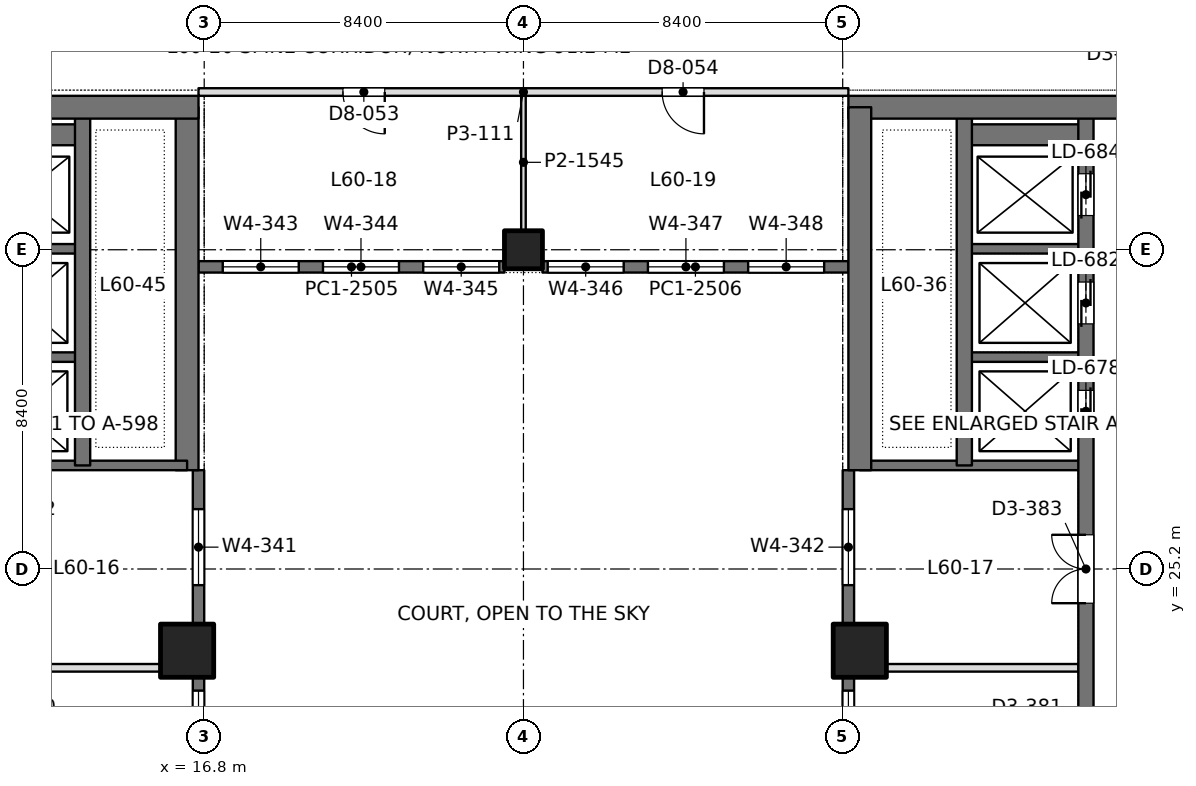
"""IFC4 building model, lengths in metres.
Left out: names, types, materials, properties, quantities, classifications, styles, units other than length and angle.
Written with IfcOpenShell. Run it as: python <this file> out.ifc"""

import sys

from ifc_helpers import new_model, si_unit, direction, frame, frame_2d, origin, origin_2d, place, context, subcontext, project, spatial, rectangle, extrude, element, fill, save


model = new_model("IFC4")
c1 = context("Model", 3, precision=1e-05, world=origin(), true_north=direction((0.0, 1.0)))
c2 = subcontext(c1, "Body", "Model", "MODEL_VIEW")
j1 = project(units=[si_unit("LENGTHUNIT", "METRE"), si_unit("PLANEANGLEUNIT", "RADIAN")], contexts=[c1])
p1 = place(None, origin())
s1 = spatial("IfcSite", under=j1, at=p1, CompositionType="ELEMENT")
p2 = place(p1, origin())
s2 = spatial("IfcBuilding", under=s1, at=p2, CompositionType="ELEMENT")
p3 = place(p2, frame((0.0, 0.0, 263.7)))
s3 = spatial("IfcBuildingStorey", under=s2, at=p3, CompositionType="ELEMENT", Elevation=263.7)
p4 = place(p3, frame((25.2, 33.6, 0.0), z_axis=(0.0, 0.0, 1.0), x_axis=(1.0, 0.0, 0.0)))
e1 = element("IfcColumn", 1, at=p4, inside=s3, PredefinedType="COLUMN", context=c2, shape_type="SweptSolid", body=[
    extrude(rectangle(XDim=1.0, YDim=1.0, at=origin_2d()), origin(), (0.0, 0.0, 1.0), 4.5),
])
for number, where, z_axis, x_axis in (
    (2, (16.35, 23.05, 0.0), (0.0, 0.0, 1.0), (1.0, 0.0, 0.0)),
    (3, (34.05, 23.05, 0.0), (0.0, 0.0, 1.0), (1.0, 0.0, 0.0)),
):
    element("IfcColumn", number, at=place(p3, frame(where, z_axis=z_axis, x_axis=x_axis)), inside=s3, PredefinedType="COLUMN", context=c2, shape_type="SweptSolid", body=[
        extrude(rectangle(XDim=1.4, YDim=1.4, at=origin_2d()), origin(), (0.0, 0.0, 1.0), 4.5),
    ])
p5 = place(p3, frame((-1.05, 37.35, 0.0), z_axis=(0.0, 0.0, 1.0), x_axis=(1.0, 0.0, 0.0)))
e4 = element("IfcWall", 4, at=p5, inside=s3, PredefinedType="SHEAR", context=c2, shape_type="SweptSolid", body=[
    extrude(rectangle(XDim=17.7, YDim=0.6, at=frame_2d((8.85, 0.0))), origin(), (0.0, 0.0, 1.0), 4.5),
])
p6 = place(p5, frame((8.8, 0.0, 0.0)))
e5 = element("IfcOpeningElement", 5, at=p6, cuts=e4, PredefinedType="OPENING", context=c2, shape_type="SweptSolid", body=[
    extrude(rectangle(XDim=1.8, YDim=2.4, at=frame_2d((0.9, 1.2))), frame((0.0, 0.31, 0.0), z_axis=(0.0, -1.0, 0.0), x_axis=(1.0, 0.0, 0.0)), (0.0, 0.0, 1.0), 0.62),
])
p7 = place(p3, frame((16.35, 27.8, 0.0), z_axis=(0.0, 0.0, 1.0), x_axis=(0.0, 1.0, 0.0)))
e6 = element("IfcWall", 6, at=p7, inside=s3, PredefinedType="SHEAR", context=c2, shape_type="SweptSolid", body=[
    extrude(rectangle(XDim=9.55, YDim=0.6, at=frame_2d((4.775, 0.0))), origin(), (0.0, 0.0, 1.0), 4.5),
])
p8 = place(p3, frame((13.6, 27.925, 0.0), z_axis=(0.0, 0.0, 1.0), x_axis=(0.0, 1.0, 0.0)))
e7 = element("IfcWall", 7, at=p8, inside=s3, PredefinedType="SHEAR", context=c2, shape_type="SweptSolid", body=[
    extrude(rectangle(XDim=9.425, YDim=0.4, at=frame_2d((4.712, 0.0))), origin(), (0.0, 0.0, 1.0), 4.5),
])
p9 = place(p3, frame((10.4, 27.925, 0.0), z_axis=(0.0, 0.0, 1.0), x_axis=(1.0, 0.0, 0.0)))
e8 = element("IfcWall", 8, at=p9, inside=s3, PredefinedType="SHEAR", context=c2, shape_type="SweptSolid", body=[
    extrude(rectangle(XDim=5.95, YDim=0.25, at=frame_2d((2.975, 0.0))), origin(), (0.0, 0.0, 1.0), 4.5),
])
for number, where, z_axis, x_axis in (
    (9, (10.4, 30.775, 0.0), (0.0, 0.0, 1.0), (1.0, 0.0, 0.0)),
    (10, (10.4, 33.625, 0.0), (0.0, 0.0, 1.0), (1.0, 0.0, 0.0)),
):
    element("IfcWall", number, at=place(p3, frame(where, z_axis=z_axis, x_axis=x_axis)), inside=s3, PredefinedType="SHEAR", context=c2, shape_type="SweptSolid", body=[
        extrude(rectangle(XDim=3.2, YDim=0.25, at=frame_2d((1.6, 0.0))), origin(), (0.0, 0.0, 1.0), 4.5),
    ])
p10 = place(p3, frame((10.4, 36.625, 0.0), z_axis=(0.0, 0.0, 1.0), x_axis=(1.0, 0.0, 0.0)))
e11 = element("IfcWall", 11, at=p10, inside=s3, PredefinedType="SHEAR", context=c2, shape_type="SweptSolid", body=[
    extrude(rectangle(XDim=3.2, YDim=0.55, at=frame_2d((1.6, 0.0))), origin(), (0.0, 0.0, 1.0), 4.5),
])
p11 = place(p3, frame((33.75, 37.35, 0.0), z_axis=(0.0, 0.0, 1.0), x_axis=(1.0, 0.0, 0.0)))
e12 = element("IfcWall", 12, at=p11, inside=s3, PredefinedType="SHEAR", context=c2, shape_type="SweptSolid", body=[
    extrude(rectangle(XDim=17.7, YDim=0.6, at=frame_2d((8.85, 0.0))), origin(), (0.0, 0.0, 1.0), 4.5),
])
p12 = place(p11, frame((7.1, 0.0, 0.0)))
e13 = element("IfcOpeningElement", 13, at=p12, cuts=e12, PredefinedType="OPENING", context=c2, shape_type="SweptSolid", body=[
    extrude(rectangle(XDim=1.8, YDim=2.4, at=frame_2d((0.9, 1.2))), frame((0.0, 0.31, 0.0), z_axis=(0.0, -1.0, 0.0), x_axis=(1.0, 0.0, 0.0)), (0.0, 0.0, 1.0), 0.62),
])
p13 = place(p3, frame((34.05, 27.8, 0.0), z_axis=(0.0, 0.0, 1.0), x_axis=(0.0, 1.0, 0.0)))
e14 = element("IfcWall", 14, at=p13, inside=s3, PredefinedType="SHEAR", context=c2, shape_type="SweptSolid", body=[
    extrude(rectangle(XDim=9.55, YDim=0.6, at=frame_2d((4.775, 0.0))), origin(), (0.0, 0.0, 1.0), 4.5),
])
p14 = place(p3, frame((40.0, 13.05, 0.0), z_axis=(0.0, 0.0, 1.0), x_axis=(0.0, 1.0, 0.0)))
e15 = element("IfcWall", 15, at=p14, inside=s3, PredefinedType="SHEAR", context=c2, shape_type="SweptSolid", body=[
    extrude(rectangle(XDim=24.3, YDim=0.4, at=frame_2d((12.15, 0.0))), origin(), (0.0, 0.0, 1.0), 4.5),
])
p15 = place(p14, frame((15.75, 0.0, 0.0)))
e16 = element("IfcOpeningElement", 16, at=p15, cuts=e15, PredefinedType="OPENING", context=c2, shape_type="SweptSolid", body=[
    extrude(rectangle(XDim=1.1, YDim=2.2, at=frame_2d((0.55, 1.1))), frame((0.0, 0.21, 0.0), z_axis=(0.0, -1.0, 0.0), x_axis=(1.0, 0.0, 0.0)), (0.0, 0.0, 1.0), 0.42),
])
p16 = place(p14, frame((18.6, 0.0, 0.0)))
e17 = element("IfcOpeningElement", 17, at=p16, cuts=e15, PredefinedType="OPENING", context=c2, shape_type="SweptSolid", body=[
    extrude(rectangle(XDim=1.1, YDim=2.2, at=frame_2d((0.55, 1.1))), frame((0.0, 0.21, 0.0), z_axis=(0.0, -1.0, 0.0), x_axis=(1.0, 0.0, 0.0)), (0.0, 0.0, 1.0), 0.42),
])
p17 = place(p14, frame((21.45, 0.0, 0.0)))
e18 = element("IfcOpeningElement", 18, at=p17, cuts=e15, PredefinedType="OPENING", context=c2, shape_type="SweptSolid", body=[
    extrude(rectangle(XDim=1.1, YDim=2.2, at=frame_2d((0.55, 1.1))), frame((0.0, 0.21, 0.0), z_axis=(0.0, -1.0, 0.0), x_axis=(1.0, 0.0, 0.0)), (0.0, 0.0, 1.0), 0.42),
])
p18 = place(p14, frame((6.05, 0.0, 0.0)))
e19 = element("IfcOpeningElement", 19, at=p18, cuts=e15, PredefinedType="OPENING", context=c2, shape_type="SweptSolid", body=[
    extrude(rectangle(XDim=1.8, YDim=2.4, at=frame_2d((0.9, 1.2))), frame((0.0, 0.21, 0.0), z_axis=(0.0, -1.0, 0.0), x_axis=(1.0, 0.0, 0.0)), (0.0, 0.0, 1.0), 0.42),
])
p19 = place(p14, frame((11.25, 0.0, 0.0)))
e20 = element("IfcOpeningElement", 20, at=p19, cuts=e15, PredefinedType="OPENING", context=c2, shape_type="SweptSolid", body=[
    extrude(rectangle(XDim=1.8, YDim=2.4, at=frame_2d((0.9, 1.2))), frame((0.0, 0.21, 0.0), z_axis=(0.0, -1.0, 0.0), x_axis=(1.0, 0.0, 0.0)), (0.0, 0.0, 1.0), 0.42),
])
p20 = place(p3, frame((36.8, 27.925, 0.0), z_axis=(0.0, 0.0, 1.0), x_axis=(0.0, 1.0, 0.0)))
e21 = element("IfcWall", 21, at=p20, inside=s3, PredefinedType="SHEAR", context=c2, shape_type="SweptSolid", body=[
    extrude(rectangle(XDim=9.425, YDim=0.4, at=frame_2d((4.712, 0.0))), origin(), (0.0, 0.0, 1.0), 4.5),
])
p21 = place(p3, frame((40.0, 27.925, 0.0), z_axis=(0.0, 0.0, 1.0), x_axis=(-1.0, 0.0, 0.0)))
e22 = element("IfcWall", 22, at=p21, inside=s3, PredefinedType="SHEAR", context=c2, shape_type="SweptSolid", body=[
    extrude(rectangle(XDim=5.95, YDim=0.25, at=frame_2d((2.975, 0.0))), origin(), (0.0, 0.0, 1.0), 4.5),
])
for number, where, z_axis, x_axis in (
    (23, (40.0, 30.775, 0.0), (0.0, 0.0, 1.0), (-1.0, 0.0, 0.0)),
    (24, (40.0, 33.625, 0.0), (0.0, 0.0, 1.0), (-1.0, 0.0, 0.0)),
):
    element("IfcWall", number, at=place(p3, frame(where, z_axis=z_axis, x_axis=x_axis)), inside=s3, PredefinedType="SHEAR", context=c2, shape_type="SweptSolid", body=[
        extrude(rectangle(XDim=3.2, YDim=0.25, at=frame_2d((1.6, 0.0))), origin(), (0.0, 0.0, 1.0), 4.5),
    ])
p22 = place(p3, frame((40.0, 36.625, 0.0), z_axis=(0.0, 0.0, 1.0), x_axis=(-1.0, 0.0, 0.0)))
e25 = element("IfcWall", 25, at=p22, inside=s3, PredefinedType="SHEAR", context=c2, shape_type="SweptSolid", body=[
    extrude(rectangle(XDim=3.2, YDim=0.55, at=frame_2d((1.6, 0.0))), origin(), (0.0, 0.0, 1.0), 4.5),
])
p23 = place(p3, frame((16.65, 17.1, 0.0), z_axis=(0.0, 0.0, 1.0), x_axis=(0.0, 1.0, 0.0)))
e26 = element("IfcWall", 26, at=p23, inside=s3, PredefinedType="SOLIDWALL", context=c2, shape_type="SweptSolid", body=[
    extrude(rectangle(XDim=10.7, YDim=0.3, at=frame_2d((5.35, 0.0))), origin(), (0.0, 0.0, 1.0), 4.35),
])
p24 = place(p23, frame((0.55, 0.0, 0.9)))
e27 = element("IfcOpeningElement", 27, at=p24, cuts=e26, PredefinedType="OPENING", context=c2, shape_type="SweptSolid", body=[
    extrude(rectangle(XDim=2.0, YDim=1.9, at=frame_2d((1.0, 0.95))), frame((0.0, 0.16, 0.0), z_axis=(0.0, -1.0, 0.0), x_axis=(1.0, 0.0, 0.0)), (0.0, 0.0, 1.0), 0.32),
])
p25 = place(p23, frame((2.9, 0.0, 0.9)))
e28 = element("IfcOpeningElement", 28, at=p25, cuts=e26, PredefinedType="OPENING", context=c2, shape_type="SweptSolid", body=[
    extrude(rectangle(XDim=2.0, YDim=1.9, at=frame_2d((1.0, 0.95))), frame((0.0, 0.16, 0.0), z_axis=(0.0, -1.0, 0.0), x_axis=(1.0, 0.0, 0.0)), (0.0, 0.0, 1.0), 0.32),
])
p26 = place(p23, frame((7.675, 0.0, 0.9)))
e29 = element("IfcOpeningElement", 29, at=p26, cuts=e26, PredefinedType="OPENING", context=c2, shape_type="SweptSolid", body=[
    extrude(rectangle(XDim=2.0, YDim=1.9, at=frame_2d((1.0, 0.95))), frame((0.0, 0.16, 0.0), z_axis=(0.0, -1.0, 0.0), x_axis=(1.0, 0.0, 0.0)), (0.0, 0.0, 1.0), 0.32),
])
p27 = place(p3, frame((33.75, 17.1, 0.0), z_axis=(0.0, 0.0, 1.0), x_axis=(0.0, 1.0, 0.0)))
e30 = element("IfcWall", 30, at=p27, inside=s3, PredefinedType="SOLIDWALL", context=c2, shape_type="SweptSolid", body=[
    extrude(rectangle(XDim=10.7, YDim=0.3, at=frame_2d((5.35, 0.0))), origin(), (0.0, 0.0, 1.0), 4.35),
])
p28 = place(p27, frame((0.55, 0.0, 0.9)))
e31 = element("IfcOpeningElement", 31, at=p28, cuts=e30, PredefinedType="OPENING", context=c2, shape_type="SweptSolid", body=[
    extrude(rectangle(XDim=2.0, YDim=1.9, at=frame_2d((1.0, 0.95))), frame((0.0, 0.16, 0.0), z_axis=(0.0, -1.0, 0.0), x_axis=(1.0, 0.0, 0.0)), (0.0, 0.0, 1.0), 0.32),
])
p29 = place(p27, frame((2.9, 0.0, 0.9)))
e32 = element("IfcOpeningElement", 32, at=p29, cuts=e30, PredefinedType="OPENING", context=c2, shape_type="SweptSolid", body=[
    extrude(rectangle(XDim=2.0, YDim=1.9, at=frame_2d((1.0, 0.95))), frame((0.0, 0.16, 0.0), z_axis=(0.0, -1.0, 0.0), x_axis=(1.0, 0.0, 0.0)), (0.0, 0.0, 1.0), 0.32),
])
p30 = place(p27, frame((7.675, 0.0, 0.9)))
e33 = element("IfcOpeningElement", 33, at=p30, cuts=e30, PredefinedType="OPENING", context=c2, shape_type="SweptSolid", body=[
    extrude(rectangle(XDim=2.0, YDim=1.9, at=frame_2d((1.0, 0.95))), frame((0.0, 0.16, 0.0), z_axis=(0.0, -1.0, 0.0), x_axis=(1.0, 0.0, 0.0)), (0.0, 0.0, 1.0), 0.32),
])
p31 = place(p3, frame((16.65, 33.15, 0.0), z_axis=(0.0, 0.0, 1.0), x_axis=(1.0, 0.0, 0.0)))
e34 = element("IfcWall", 34, at=p31, inside=s3, PredefinedType="SOLIDWALL", context=c2, shape_type="SweptSolid", body=[
    extrude(rectangle(XDim=8.05, YDim=0.3, at=frame_2d((4.025, 0.0))), origin(), (0.0, 0.0, 1.0), 4.35),
])
p32 = place(p31, frame((0.637, 0.0, 0.9)))
e35 = element("IfcOpeningElement", 35, at=p32, cuts=e34, PredefinedType="OPENING", context=c2, shape_type="SweptSolid", body=[
    extrude(rectangle(XDim=2.0, YDim=1.9, at=frame_2d((1.0, 0.95))), frame((0.0, 0.16, 0.0), z_axis=(0.0, -1.0, 0.0), x_axis=(1.0, 0.0, 0.0)), (0.0, 0.0, 1.0), 0.32),
])
p33 = place(p31, frame((3.275, 0.0, 0.9)))
e36 = element("IfcOpeningElement", 36, at=p33, cuts=e34, PredefinedType="OPENING", context=c2, shape_type="SweptSolid", body=[
    extrude(rectangle(XDim=2.0, YDim=1.9, at=frame_2d((1.0, 0.95))), frame((0.0, 0.16, 0.0), z_axis=(0.0, -1.0, 0.0), x_axis=(1.0, 0.0, 0.0)), (0.0, 0.0, 1.0), 0.32),
])
p34 = place(p31, frame((5.913, 0.0, 0.9)))
e37 = element("IfcOpeningElement", 37, at=p34, cuts=e34, PredefinedType="OPENING", context=c2, shape_type="SweptSolid", body=[
    extrude(rectangle(XDim=2.0, YDim=1.9, at=frame_2d((1.0, 0.95))), frame((0.0, 0.16, 0.0), z_axis=(0.0, -1.0, 0.0), x_axis=(1.0, 0.0, 0.0)), (0.0, 0.0, 1.0), 0.32),
])
p35 = place(p3, frame((25.7, 33.15, 0.0), z_axis=(0.0, 0.0, 1.0), x_axis=(1.0, 0.0, 0.0)))
e38 = element("IfcWall", 38, at=p35, inside=s3, PredefinedType="SOLIDWALL", context=c2, shape_type="SweptSolid", body=[
    extrude(rectangle(XDim=8.05, YDim=0.3, at=frame_2d((4.025, 0.0))), origin(), (0.0, 0.0, 1.0), 4.35),
])
p36 = place(p35, frame((0.137, 0.0, 0.9)))
e39 = element("IfcOpeningElement", 39, at=p36, cuts=e38, PredefinedType="OPENING", context=c2, shape_type="SweptSolid", body=[
    extrude(rectangle(XDim=2.0, YDim=1.9, at=frame_2d((1.0, 0.95))), frame((0.0, 0.16, 0.0), z_axis=(0.0, -1.0, 0.0), x_axis=(1.0, 0.0, 0.0)), (0.0, 0.0, 1.0), 0.32),
])
p37 = place(p35, frame((2.775, 0.0, 0.9)))
e40 = element("IfcOpeningElement", 40, at=p37, cuts=e38, PredefinedType="OPENING", context=c2, shape_type="SweptSolid", body=[
    extrude(rectangle(XDim=2.0, YDim=1.9, at=frame_2d((1.0, 0.95))), frame((0.0, 0.16, 0.0), z_axis=(0.0, -1.0, 0.0), x_axis=(1.0, 0.0, 0.0)), (0.0, 0.0, 1.0), 0.32),
])
p38 = place(p35, frame((5.413, 0.0, 0.9)))
e41 = element("IfcOpeningElement", 41, at=p38, cuts=e38, PredefinedType="OPENING", context=c2, shape_type="SweptSolid", body=[
    extrude(rectangle(XDim=2.0, YDim=1.9, at=frame_2d((1.0, 0.95))), frame((0.0, 0.16, 0.0), z_axis=(0.0, -1.0, 0.0), x_axis=(1.0, 0.0, 0.0)), (0.0, 0.0, 1.0), 0.32),
])
for number, where, z_axis, x_axis in (
    (42, (10.598, 22.6, 0.0), (0.0, 0.0, 1.0), (1.0, 0.0, 0.0)),
    (43, (34.749, 22.6, 0.0), (0.0, 0.0, 1.0), (1.0, 0.0, 0.0)),
):
    element("IfcWall", number, at=place(p3, frame(where, z_axis=z_axis, x_axis=x_axis)), inside=s3, PredefinedType="PARTITIONING", context=c2, shape_type="SweptSolid", body=[
        extrude(rectangle(XDim=5.053, YDim=0.2, at=frame_2d((2.526, 0.0))), origin(), (0.0, 0.0, 1.0), 4.35),
    ])
p39 = place(p3, frame((25.2, 34.099, 0.0), z_axis=(0.0, 0.0, 1.0), x_axis=(0.0, 1.0, 0.0)))
e44 = element("IfcWall", 44, at=p39, inside=s3, PredefinedType="PARTITIONING", context=c2, shape_type="SweptSolid", body=[
    extrude(rectangle(XDim=3.603, YDim=0.12, at=frame_2d((1.801, 0.0))), origin(), (0.0, 0.0, 1.0), 3.8),
])
p40 = place(p3, frame((16.65, 37.75, 0.0), z_axis=(0.0, 0.0, 1.0), x_axis=(1.0, 0.0, 0.0)))
e45 = element("IfcWall", 45, at=p40, inside=s3, PredefinedType="PARTITIONING", context=c2, shape_type="SweptSolid", body=[
    extrude(rectangle(XDim=17.1, YDim=0.2, at=frame_2d((8.55, 0.0))), origin(), (0.0, 0.0, 1.0), 3.8),
])
p41 = place(p40, frame((3.8, 0.0, 0.0)))
e46 = element("IfcOpeningElement", 46, at=p41, cuts=e45, PredefinedType="OPENING", context=c2, shape_type="SweptSolid", body=[
    extrude(rectangle(XDim=1.1, YDim=2.4, at=frame_2d((0.55, 1.2))), frame((0.0, 0.11, 0.0), z_axis=(0.0, -1.0, 0.0), x_axis=(1.0, 0.0, 0.0)), (0.0, 0.0, 1.0), 0.22),
])
p42 = place(p40, frame((12.2, 0.0, 0.0)))
e47 = element("IfcOpeningElement", 47, at=p42, cuts=e45, PredefinedType="OPENING", context=c2, shape_type="SweptSolid", body=[
    extrude(rectangle(XDim=1.1, YDim=2.4, at=frame_2d((0.55, 1.2))), frame((0.0, 0.11, 0.0), z_axis=(0.0, -1.0, 0.0), x_axis=(1.0, 0.0, 0.0)), (0.0, 0.0, 1.0), 0.22),
])
p43 = place(p25, origin())
e48 = element("IfcWindow", 48, at=p43, inside=s3, PartitioningType="SINGLE_PANEL", PredefinedType="WINDOW", context=c2, shape_type="SweptSolid", body=[
    extrude(rectangle(XDim=2.0, YDim=1.9, at=frame_2d((1.0, 0.95))), frame((0.0, 0.03, 0.0), z_axis=(0.0, -1.0, 0.0), x_axis=(1.0, 0.0, 0.0)), (0.0, 0.0, 1.0), 0.06),
])
fill(e28, e48)
p44 = place(p26, origin())
e49 = element("IfcWindow", 49, at=p44, inside=s3, PartitioningType="SINGLE_PANEL", PredefinedType="WINDOW", context=c2, shape_type="SweptSolid", body=[
    extrude(rectangle(XDim=2.0, YDim=1.9, at=frame_2d((1.0, 0.95))), frame((0.0, 0.03, 0.0), z_axis=(0.0, -1.0, 0.0), x_axis=(1.0, 0.0, 0.0)), (0.0, 0.0, 1.0), 0.06),
])
fill(e29, e49)
p45 = place(p29, origin())
e50 = element("IfcWindow", 50, at=p45, inside=s3, PartitioningType="SINGLE_PANEL", PredefinedType="WINDOW", context=c2, shape_type="SweptSolid", body=[
    extrude(rectangle(XDim=2.0, YDim=1.9, at=frame_2d((1.0, 0.95))), frame((0.0, 0.03, 0.0), z_axis=(0.0, -1.0, 0.0), x_axis=(1.0, 0.0, 0.0)), (0.0, 0.0, 1.0), 0.06),
])
fill(e32, e50)
p46 = place(p30, origin())
e51 = element("IfcWindow", 51, at=p46, inside=s3, PartitioningType="SINGLE_PANEL", PredefinedType="WINDOW", context=c2, shape_type="SweptSolid", body=[
    extrude(rectangle(XDim=2.0, YDim=1.9, at=frame_2d((1.0, 0.95))), frame((0.0, 0.03, 0.0), z_axis=(0.0, -1.0, 0.0), x_axis=(1.0, 0.0, 0.0)), (0.0, 0.0, 1.0), 0.06),
])
fill(e33, e51)
p47 = place(p32, origin())
e52 = element("IfcWindow", 52, at=p47, inside=s3, PartitioningType="SINGLE_PANEL", PredefinedType="WINDOW", context=c2, shape_type="SweptSolid", body=[
    extrude(rectangle(XDim=2.0, YDim=1.9, at=frame_2d((1.0, 0.95))), frame((0.0, 0.03, 0.0), z_axis=(0.0, -1.0, 0.0), x_axis=(1.0, 0.0, 0.0)), (0.0, 0.0, 1.0), 0.06),
])
fill(e35, e52)
p48 = place(p33, origin())
e53 = element("IfcWindow", 53, at=p48, inside=s3, PartitioningType="SINGLE_PANEL", PredefinedType="WINDOW", context=c2, shape_type="SweptSolid", body=[
    extrude(rectangle(XDim=2.0, YDim=1.9, at=frame_2d((1.0, 0.95))), frame((0.0, 0.03, 0.0), z_axis=(0.0, -1.0, 0.0), x_axis=(1.0, 0.0, 0.0)), (0.0, 0.0, 1.0), 0.06),
])
fill(e36, e53)
p49 = place(p34, origin())
e54 = element("IfcWindow", 54, at=p49, inside=s3, PartitioningType="SINGLE_PANEL", PredefinedType="WINDOW", context=c2, shape_type="SweptSolid", body=[
    extrude(rectangle(XDim=2.0, YDim=1.9, at=frame_2d((1.0, 0.95))), frame((0.0, 0.03, 0.0), z_axis=(0.0, -1.0, 0.0), x_axis=(1.0, 0.0, 0.0)), (0.0, 0.0, 1.0), 0.06),
])
fill(e37, e54)
p50 = place(p36, origin())
e55 = element("IfcWindow", 55, at=p50, inside=s3, PartitioningType="SINGLE_PANEL", PredefinedType="WINDOW", context=c2, shape_type="SweptSolid", body=[
    extrude(rectangle(XDim=2.0, YDim=1.9, at=frame_2d((1.0, 0.95))), frame((0.0, 0.03, 0.0), z_axis=(0.0, -1.0, 0.0), x_axis=(1.0, 0.0, 0.0)), (0.0, 0.0, 1.0), 0.06),
])
fill(e39, e55)
p51 = place(p37, origin())
e56 = element("IfcWindow", 56, at=p51, inside=s3, PartitioningType="SINGLE_PANEL", PredefinedType="WINDOW", context=c2, shape_type="SweptSolid", body=[
    extrude(rectangle(XDim=2.0, YDim=1.9, at=frame_2d((1.0, 0.95))), frame((0.0, 0.03, 0.0), z_axis=(0.0, -1.0, 0.0), x_axis=(1.0, 0.0, 0.0)), (0.0, 0.0, 1.0), 0.06),
])
fill(e40, e56)
p52 = place(p38, origin())
e57 = element("IfcWindow", 57, at=p52, inside=s3, PartitioningType="SINGLE_PANEL", PredefinedType="WINDOW", context=c2, shape_type="SweptSolid", body=[
    extrude(rectangle(XDim=2.0, YDim=1.9, at=frame_2d((1.0, 0.95))), frame((0.0, 0.03, 0.0), z_axis=(0.0, -1.0, 0.0), x_axis=(1.0, 0.0, 0.0)), (0.0, 0.0, 1.0), 0.06),
])
fill(e41, e57)
p53 = place(p15, origin())
e58 = element("IfcDoor", 58, at=p53, inside=s3, OperationType="DOUBLE_DOOR_SLIDING", PredefinedType="DOOR", context=c2, shape_type="SweptSolid", body=[
    extrude(rectangle(XDim=1.1, YDim=2.2, at=frame_2d((0.55, 1.1))), frame((0.0, 0.025, 0.0), z_axis=(0.0, -1.0, 0.0), x_axis=(1.0, 0.0, 0.0)), (0.0, 0.0, 1.0), 0.05),
])
fill(e16, e58)
p54 = place(p16, origin())
e59 = element("IfcDoor", 59, at=p54, inside=s3, OperationType="DOUBLE_DOOR_SLIDING", PredefinedType="DOOR", context=c2, shape_type="SweptSolid", body=[
    extrude(rectangle(XDim=1.1, YDim=2.2, at=frame_2d((0.55, 1.1))), frame((0.0, 0.025, 0.0), z_axis=(0.0, -1.0, 0.0), x_axis=(1.0, 0.0, 0.0)), (0.0, 0.0, 1.0), 0.05),
])
fill(e17, e59)
p55 = place(p17, origin())
e60 = element("IfcDoor", 60, at=p55, inside=s3, OperationType="DOUBLE_DOOR_SLIDING", PredefinedType="DOOR", context=c2, shape_type="SweptSolid", body=[
    extrude(rectangle(XDim=1.1, YDim=2.2, at=frame_2d((0.55, 1.1))), frame((0.0, 0.025, 0.0), z_axis=(0.0, -1.0, 0.0), x_axis=(1.0, 0.0, 0.0)), (0.0, 0.0, 1.0), 0.05),
])
fill(e18, e60)
p56 = place(p19, origin())
e61 = element("IfcDoor", 61, at=p56, inside=s3, OperationType="DOUBLE_DOOR_SINGLE_SWING", PredefinedType="DOOR", context=c2, shape_type="SweptSolid", body=[
    extrude(rectangle(XDim=1.8, YDim=2.4, at=frame_2d((0.9, 1.2))), frame((0.0, 0.025, 0.0), z_axis=(0.0, -1.0, 0.0), x_axis=(1.0, 0.0, 0.0)), (0.0, 0.0, 1.0), 0.05),
])
fill(e20, e61)
p57 = place(p41, frame((1.1, 0.0, 0.0), z_axis=(0.0, 0.0, 1.0), x_axis=(-1.0, 0.0, 0.0)))
e62 = element("IfcDoor", 62, at=p57, inside=s3, OperationType="SINGLE_SWING_LEFT", PredefinedType="DOOR", context=c2, shape_type="SweptSolid", body=[
    extrude(rectangle(XDim=1.1, YDim=2.4, at=frame_2d((0.55, 1.2))), frame((0.0, 0.025, 0.0), z_axis=(0.0, -1.0, 0.0), x_axis=(1.0, 0.0, 0.0)), (0.0, 0.0, 1.0), 0.05),
])
fill(e46, e62)
p58 = place(p42, frame((1.1, 0.0, 0.0), z_axis=(0.0, 0.0, 1.0), x_axis=(-1.0, 0.0, 0.0)))
e63 = element("IfcDoor", 63, at=p58, inside=s3, OperationType="SINGLE_SWING_LEFT", PredefinedType="DOOR", context=c2, shape_type="SweptSolid", body=[
    extrude(rectangle(XDim=1.1, YDim=2.4, at=frame_2d((0.55, 1.2))), frame((0.0, 0.025, 0.0), z_axis=(0.0, -1.0, 0.0), x_axis=(1.0, 0.0, 0.0)), (0.0, 0.0, 1.0), 0.05),
])
fill(e47, e63)
save(model, sys.argv[1])
